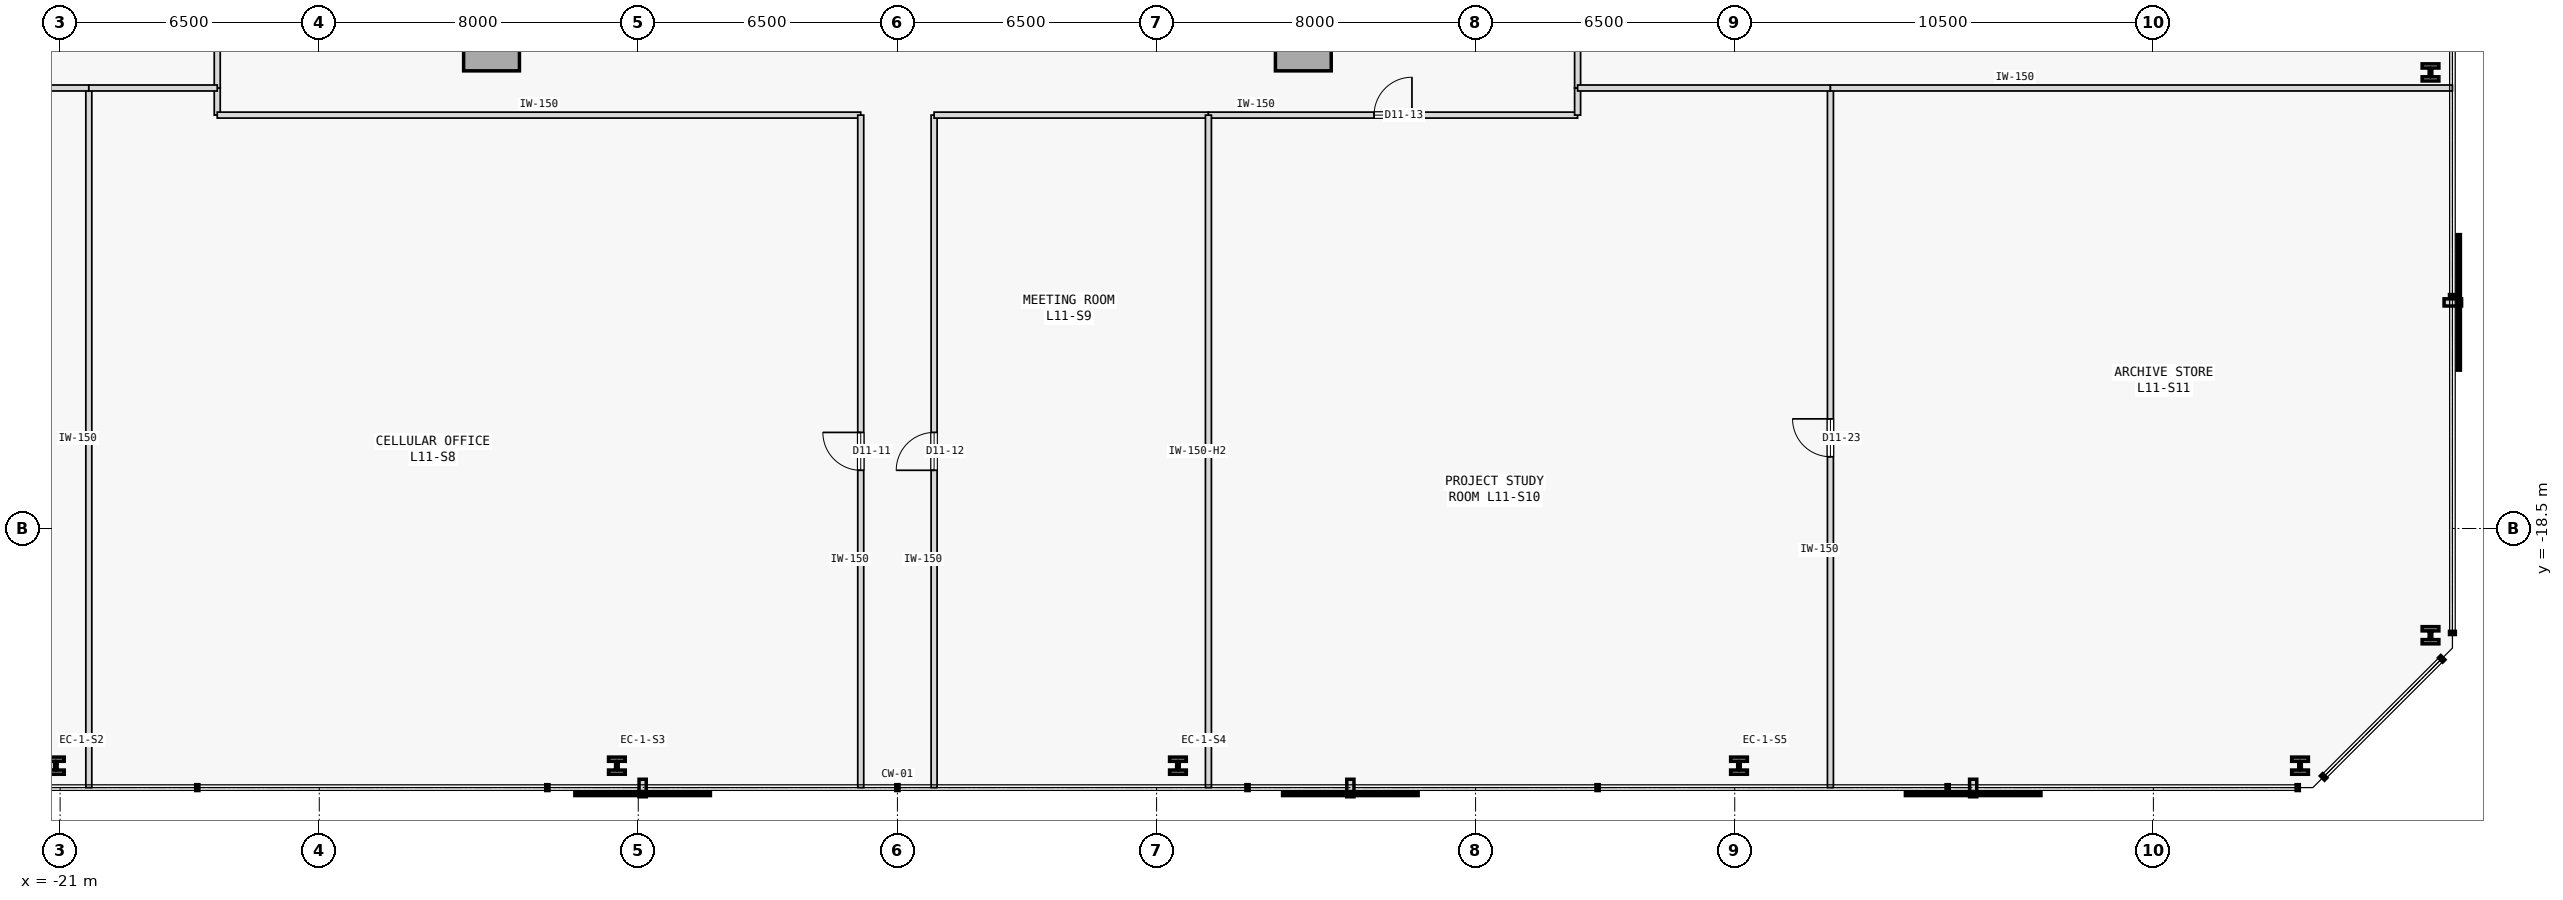
"""IFC4 building model, lengths in metres.
Left out: names, types, materials, properties, quantities, classifications, styles, units other than length and angle.
Written with IfcOpenShell. Run it as: python <this file> out.ifc"""

import sys

from ifc_helpers import new_model, si_unit, direction, frame, frame_2d, origin, origin_2d, place, context, subcontext, project, spatial, rectangle, i_section, extrude, element, fill, save


model = new_model("IFC4")
c1 = context("Model", 3, precision=1e-05, world=origin(), true_north=direction((0.0, 1.0)))
c2 = subcontext(c1, "Body", "Model", "MODEL_VIEW")
j1 = project(units=[si_unit("LENGTHUNIT", "METRE"), si_unit("PLANEANGLEUNIT", "RADIAN")], contexts=[c1])
p1 = place(None, origin())
s1 = spatial("IfcSite", under=j1, at=p1, CompositionType="ELEMENT")
p2 = place(p1, origin())
s2 = spatial("IfcBuilding", under=s1, at=p2, CompositionType="ELEMENT")
p3 = place(p2, frame((0.0, 0.0, 48.4)))
s3 = spatial("IfcBuildingStorey", under=s2, at=p3, CompositionType="ELEMENT", Elevation=48.4)
for number, where, z_axis, x_axis in (
    (1, (-10.18, -6.32, 0.0), (0.0, 0.0, 1.0), (1.0, 0.0, 0.0)),
    (2, (10.18, -6.32, 0.0), (0.0, 0.0, 1.0), (1.0, 0.0, 0.0)),
):
    element("IfcColumn", number, at=place(p3, frame(where, z_axis=z_axis, x_axis=x_axis)), inside=s3, PredefinedType="COLUMN", context=c2, shape_type="SweptSolid", body=[
        extrude(rectangle(XDim=1.4, YDim=1.4, at=origin_2d()), origin(), (0.0, 0.0, 1.0), 3.8),
    ])
for number, where, z_axis, x_axis in (
    (3, (-21.107, -24.45, 0.0), (0.0, 0.0, 1.0), (1.0, 0.0, 0.0)),
    (4, (-7.036, -24.45, 0.0), (0.0, 0.0, 1.0), (1.0, 0.0, 0.0)),
    (5, (7.036, -24.45, 0.0), (0.0, 0.0, 1.0), (1.0, 0.0, 0.0)),
    (6, (21.107, -24.45, 0.0), (0.0, 0.0, 1.0), (1.0, 0.0, 0.0)),
    (7, (35.178, -24.45, 0.0), (0.0, 0.0, 1.0), (1.0, 0.0, 0.0)),
    (8, (38.45, -21.178, 0.0), (0.0, 0.0, 1.0), (1.0, 0.0, 0.0)),
    (9, (38.45, -7.059, 0.0), (0.0, 0.0, 1.0), (1.0, 0.0, 0.0)),
):
    element("IfcColumn", number, at=place(p3, frame(where, z_axis=z_axis, x_axis=x_axis)), inside=s3, PredefinedType="COLUMN", context=c2, shape_type="SweptSolid", body=[
        extrude(i_section(OverallWidth=0.42, OverallDepth=0.431, WebThickness=0.065, FlangeThickness=0.106, FilletRadius=0.015, at=origin_2d()), origin(), (0.0, 0.0, 1.0), 3.8),
    ])
p4 = place(p3, frame((-17.059, -8.13, 0.0), z_axis=(0.0, 0.0, 1.0), x_axis=(0.0, 1.0, 0.0)))
e10 = element("IfcWall", 10, at=p4, inside=s3, PredefinedType="PARTITIONING", context=c2, shape_type="SweptSolid", body=[
    extrude(rectangle(XDim=0.68, YDim=0.15, at=frame_2d((0.34, 0.0))), origin(), (0.0, 0.0, 1.0), 3.575),
])
p5 = place(p3, frame((-17.059, -8.13, 0.0), z_axis=(0.0, 0.0, 1.0), x_axis=(1.0, 0.0, 0.0)))
e11 = element("IfcWall", 11, at=p5, inside=s3, PredefinedType="PARTITIONING", context=c2, shape_type="SweptSolid", body=[
    extrude(rectangle(XDim=16.139, YDim=0.15, at=frame_2d((8.07, 0.0))), origin(), (0.0, 0.0, 1.0), 3.575),
])
p6 = place(p3, frame((-0.92, -25.0, 0.0), z_axis=(0.0, 0.0, 1.0), x_axis=(0.0, 1.0, 0.0)))
e12 = element("IfcWall", 12, at=p6, inside=s3, PredefinedType="PARTITIONING", context=c2, shape_type="SweptSolid", body=[
    extrude(rectangle(XDim=16.87, YDim=0.15, at=frame_2d((8.435, 0.0))), origin(), (0.0, 0.0, 1.0), 3.575),
])
p7 = place(p6, frame((7.96, 0.0, 0.0)))
e13 = element("IfcOpeningElement", 13, at=p7, cuts=e12, PredefinedType="OPENING", context=c2, shape_type="SweptSolid", body=[
    extrude(rectangle(XDim=0.95, YDim=2.15, at=frame_2d((0.475, 1.075))), frame((0.0, 0.085, 0.0), z_axis=(0.0, -1.0, 0.0), x_axis=(1.0, 0.0, 0.0)), (0.0, 0.0, 1.0), 0.17),
])
p8 = place(p3, frame((0.92, -25.0, 0.0), z_axis=(0.0, 0.0, 1.0), x_axis=(0.0, 1.0, 0.0)))
e14 = element("IfcWall", 14, at=p8, inside=s3, PredefinedType="PARTITIONING", context=c2, shape_type="SweptSolid", body=[
    extrude(rectangle(XDim=16.87, YDim=0.15, at=frame_2d((8.435, 0.0))), origin(), (0.0, 0.0, 1.0), 3.575),
])
p9 = place(p8, frame((7.96, 0.0, 0.0)))
e15 = element("IfcOpeningElement", 15, at=p9, cuts=e14, PredefinedType="OPENING", context=c2, shape_type="SweptSolid", body=[
    extrude(rectangle(XDim=0.95, YDim=2.15, at=frame_2d((0.475, 1.075))), frame((0.0, 0.085, 0.0), z_axis=(0.0, -1.0, 0.0), x_axis=(1.0, 0.0, 0.0)), (0.0, 0.0, 1.0), 0.17),
])
p10 = place(p3, frame((0.92, -8.13, 0.0), z_axis=(0.0, 0.0, 1.0), x_axis=(1.0, 0.0, 0.0)))
e16 = element("IfcWall", 16, at=p10, inside=s3, PredefinedType="PARTITIONING", context=c2, shape_type="SweptSolid", body=[
    extrude(rectangle(XDim=6.88, YDim=0.15, at=frame_2d((3.44, 0.0))), origin(), (0.0, 0.0, 1.0), 3.575),
])
p11 = place(p3, frame((7.8, -8.13, 0.0), z_axis=(0.0, 0.0, 1.0), x_axis=(1.0, 0.0, 0.0)))
e17 = element("IfcWall", 17, at=p11, inside=s3, PredefinedType="PARTITIONING", context=c2, shape_type="SweptSolid", body=[
    extrude(rectangle(XDim=9.259, YDim=0.15, at=frame_2d((4.629, 0.0))), origin(), (0.0, 0.0, 1.0), 3.575),
])
p12 = place(p11, frame((4.155, 0.0, 0.0)))
e18 = element("IfcOpeningElement", 18, at=p12, cuts=e17, PredefinedType="OPENING", context=c2, shape_type="SweptSolid", body=[
    extrude(rectangle(XDim=0.95, YDim=2.15, at=frame_2d((0.475, 1.075))), frame((0.0, 0.085, 0.0), z_axis=(0.0, -1.0, 0.0), x_axis=(1.0, 0.0, 0.0)), (0.0, 0.0, 1.0), 0.17),
])
p13 = place(p3, frame((17.059, -8.13, 0.0), z_axis=(0.0, 0.0, 1.0), x_axis=(0.0, 1.0, 0.0)))
e19 = element("IfcWall", 19, at=p13, inside=s3, PredefinedType="PARTITIONING", context=c2, shape_type="SweptSolid", body=[
    extrude(rectangle(XDim=0.68, YDim=0.15, at=frame_2d((0.34, 0.0))), origin(), (0.0, 0.0, 1.0), 3.575),
])
p14 = place(p3, frame((-17.059, -7.45, 0.0), z_axis=(0.0, 0.0, 1.0), x_axis=(0.0, 1.0, 0.0)))
e20 = element("IfcWall", 20, at=p14, inside=s3, PredefinedType="PARTITIONING", context=c2, shape_type="SweptSolid", body=[
    extrude(rectangle(XDim=3.129, YDim=0.15, at=frame_2d((1.564, 0.0))), origin(), (0.0, 0.0, 1.0), 3.575),
])
p15 = place(p14, frame((1.09, 0.0, 0.0)))
e21 = element("IfcOpeningElement", 21, at=p15, cuts=e20, PredefinedType="OPENING", context=c2, shape_type="SweptSolid", body=[
    extrude(rectangle(XDim=0.95, YDim=2.15, at=frame_2d((0.475, 1.075))), frame((0.0, 0.085, 0.0), z_axis=(0.0, -1.0, 0.0), x_axis=(1.0, 0.0, 0.0)), (0.0, 0.0, 1.0), 0.17),
])
p16 = place(p3, frame((17.059, -7.45, 0.0), z_axis=(0.0, 0.0, 1.0), x_axis=(0.0, 1.0, 0.0)))
e22 = element("IfcWall", 22, at=p16, inside=s3, PredefinedType="PARTITIONING", context=c2, shape_type="SweptSolid", body=[
    extrude(rectangle(XDim=6.53, YDim=0.15, at=frame_2d((3.265, 0.0))), origin(), (0.0, 0.0, 1.0), 3.575),
])
p17 = place(p3, frame((-20.28, -25.0, 0.0), z_axis=(0.0, 0.0, 1.0), x_axis=(0.0, 1.0, 0.0)))
e23 = element("IfcWall", 23, at=p17, inside=s3, PredefinedType="PARTITIONING", context=c2, shape_type="SweptSolid", body=[
    extrude(rectangle(XDim=17.55, YDim=0.15, at=frame_2d((8.775, 0.0))), origin(), (0.0, 0.0, 1.0), 3.575),
])
p18 = place(p3, frame((-39.0, -7.45, 0.0), z_axis=(0.0, 0.0, 1.0), x_axis=(1.0, 0.0, 0.0)))
e24 = element("IfcWall", 24, at=p18, inside=s3, PredefinedType="PARTITIONING", context=c2, shape_type="SweptSolid", body=[
    extrude(rectangle(XDim=18.72, YDim=0.15, at=frame_2d((9.36, 0.0))), origin(), (0.0, 0.0, 1.0), 3.575),
])
p19 = place(p18, frame((8.885, 0.0, 0.0)))
e25 = element("IfcOpeningElement", 25, at=p19, cuts=e24, PredefinedType="OPENING", context=c2, shape_type="SweptSolid", body=[
    extrude(rectangle(XDim=0.95, YDim=2.15, at=frame_2d((0.475, 1.075))), frame((0.0, 0.085, 0.0), z_axis=(0.0, -1.0, 0.0), x_axis=(1.0, 0.0, 0.0)), (0.0, 0.0, 1.0), 0.17),
])
p20 = place(p3, frame((-20.28, -7.45, 0.0), z_axis=(0.0, 0.0, 1.0), x_axis=(1.0, 0.0, 0.0)))
e26 = element("IfcWall", 26, at=p20, inside=s3, PredefinedType="PARTITIONING", context=c2, shape_type="SweptSolid", body=[
    extrude(rectangle(XDim=3.221, YDim=0.15, at=frame_2d((1.61, 0.0))), origin(), (0.0, 0.0, 1.0), 3.575),
])
p21 = place(p3, frame((7.8, -25.0, 0.0), z_axis=(0.0, 0.0, 1.0), x_axis=(0.0, 1.0, 0.0)))
e27 = element("IfcWall", 27, at=p21, inside=s3, PredefinedType="PARTITIONING", context=c2, shape_type="SweptSolid", body=[
    extrude(rectangle(XDim=16.87, YDim=0.15, at=frame_2d((8.435, 0.0))), origin(), (0.0, 0.0, 1.0), 2.975),
])
p22 = place(p3, frame((23.4, -25.0, 0.0), z_axis=(0.0, 0.0, 1.0), x_axis=(0.0, 1.0, 0.0)))
e28 = element("IfcWall", 28, at=p22, inside=s3, PredefinedType="PARTITIONING", context=c2, shape_type="SweptSolid", body=[
    extrude(rectangle(XDim=17.55, YDim=0.15, at=frame_2d((8.775, 0.0))), origin(), (0.0, 0.0, 1.0), 3.575),
])
p23 = place(p22, frame((8.3, 0.0, 0.0)))
e29 = element("IfcOpeningElement", 29, at=p23, cuts=e28, PredefinedType="OPENING", context=c2, shape_type="SweptSolid", body=[
    extrude(rectangle(XDim=0.95, YDim=2.15, at=frame_2d((0.475, 1.075))), frame((0.0, 0.085, 0.0), z_axis=(0.0, -1.0, 0.0), x_axis=(1.0, 0.0, 0.0)), (0.0, 0.0, 1.0), 0.17),
])
p24 = place(p3, frame((17.059, -7.45, 0.0), z_axis=(0.0, 0.0, 1.0), x_axis=(1.0, 0.0, 0.0)))
e30 = element("IfcWall", 30, at=p24, inside=s3, PredefinedType="PARTITIONING", context=c2, shape_type="SweptSolid", body=[
    extrude(rectangle(XDim=6.341, YDim=0.15, at=frame_2d((3.17, 0.0))), origin(), (0.0, 0.0, 1.0), 3.575),
])
p25 = place(p3, frame((23.4, -7.45, 0.0), z_axis=(0.0, 0.0, 1.0), x_axis=(1.0, 0.0, 0.0)))
e31 = element("IfcWall", 31, at=p25, inside=s3, PredefinedType="PARTITIONING", context=c2, shape_type="SweptSolid", body=[
    extrude(rectangle(XDim=15.6, YDim=0.15, at=frame_2d((7.8, 0.0))), origin(), (0.0, 0.0, 1.0), 3.575),
])
p26 = place(p7, origin())
e32 = element("IfcDoor", 32, at=p26, inside=s3, OperationType="SINGLE_SWING_RIGHT", PredefinedType="DOOR", context=c2, shape_type="SweptSolid", body=[
    extrude(rectangle(XDim=0.95, YDim=2.15, at=frame_2d((0.475, 1.075))), frame((0.0, 0.025, 0.0), z_axis=(0.0, -1.0, 0.0), x_axis=(1.0, 0.0, 0.0)), (0.0, 0.0, 1.0), 0.05),
])
fill(e13, e32)
p27 = place(p9, origin())
e33 = element("IfcDoor", 33, at=p27, inside=s3, OperationType="SINGLE_SWING_LEFT", PredefinedType="DOOR", context=c2, shape_type="SweptSolid", body=[
    extrude(rectangle(XDim=0.95, YDim=2.15, at=frame_2d((0.475, 1.075))), frame((0.0, 0.025, 0.0), z_axis=(0.0, -1.0, 0.0), x_axis=(1.0, 0.0, 0.0)), (0.0, 0.0, 1.0), 0.05),
])
fill(e15, e33)
p28 = place(p12, origin())
e34 = element("IfcDoor", 34, at=p28, inside=s3, OperationType="SINGLE_SWING_RIGHT", PredefinedType="DOOR", context=c2, shape_type="SweptSolid", body=[
    extrude(rectangle(XDim=0.95, YDim=2.15, at=frame_2d((0.475, 1.075))), frame((0.0, 0.025, 0.0), z_axis=(0.0, -1.0, 0.0), x_axis=(1.0, 0.0, 0.0)), (0.0, 0.0, 1.0), 0.05),
])
fill(e18, e34)
p29 = place(p23, origin())
e35 = element("IfcDoor", 35, at=p29, inside=s3, OperationType="SINGLE_SWING_RIGHT", PredefinedType="DOOR", context=c2, shape_type="SweptSolid", body=[
    extrude(rectangle(XDim=0.95, YDim=2.15, at=frame_2d((0.475, 1.075))), frame((0.0, 0.025, 0.0), z_axis=(0.0, -1.0, 0.0), x_axis=(1.0, 0.0, 0.0)), (0.0, 0.0, 1.0), 0.05),
])
fill(e29, e35)
save(model, sys.argv[1])
